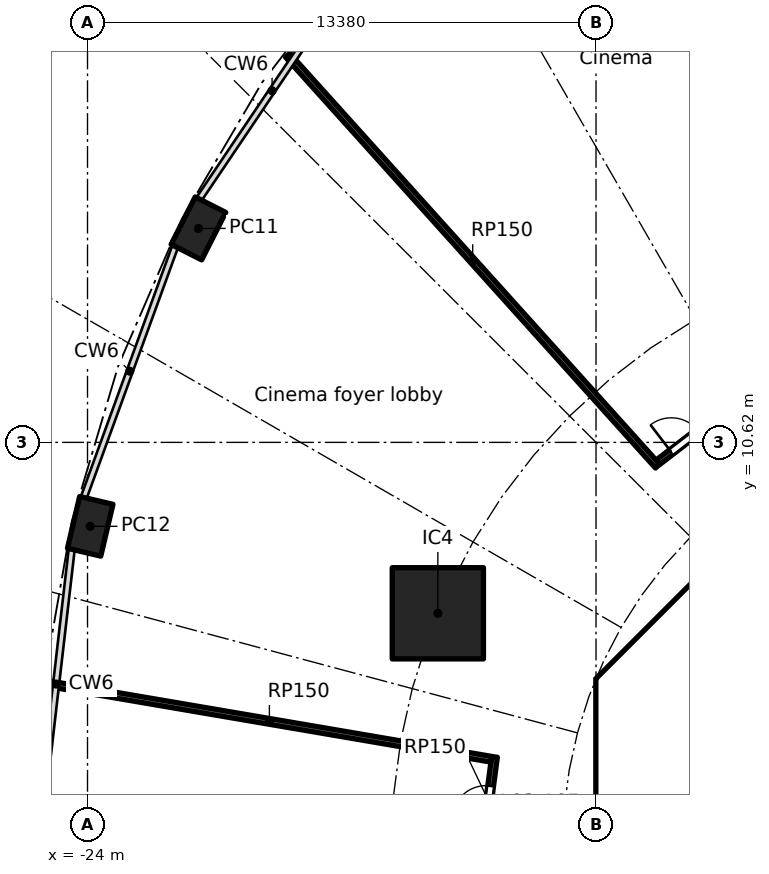
"""IFC4 building model, lengths in metres.
Left out: names, types, materials, properties, quantities, classifications, styles, units other than length and angle.
Written with IfcOpenShell. Run it as: python <this file> out.ifc"""

import sys

from ifc_helpers import new_model, si_unit, direction, frame, frame_2d, origin, origin_2d, place, context, subcontext, project, spatial, polyline, rectangle, hollow_rectangle, outline, extrude, element, fill, save


model = new_model("IFC4")
c1 = context("Model", 3, precision=1e-05, world=origin(), true_north=direction((0.0, 1.0)))
c2 = subcontext(c1, "Body", "Model", "MODEL_VIEW")
j1 = project(units=[si_unit("LENGTHUNIT", "METRE"), si_unit("PLANEANGLEUNIT", "RADIAN")], contexts=[c1])
p1 = place(None, origin())
s1 = spatial("IfcSite", under=j1, at=p1, CompositionType="ELEMENT")
p2 = place(p1, origin())
s2 = spatial("IfcBuilding", under=s1, at=p2, CompositionType="ELEMENT")
p3 = place(p2, frame((0.0, 0.0, 17.0)))
s3 = spatial("IfcBuildingStorey", under=s2, at=p3, CompositionType="ELEMENT", Elevation=17.0)
for number, where, z_axis, x_axis in (
    (1, (-21.082, 16.25, 0.0), (0.0, 0.0, 1.0), (-0.452, -0.892, 0.0)),
    (2, (-23.929, 8.412, 0.0), (0.0, 0.0, 1.0), (-0.229, -0.973, 0.0)),
):
    element("IfcColumn", number, at=place(p3, frame(where, z_axis=z_axis, x_axis=x_axis)), inside=s3, PredefinedType="COLUMN", context=c2, shape_type="SweptSolid", body=[
        extrude(hollow_rectangle(XDim=1.4, YDim=0.9, WallThickness=0.05, at=origin_2d()), origin(), (0.0, 0.0, 1.0), 5.0),
    ])
p4 = place(p3, frame((-14.782, 6.123, 0.0), z_axis=(0.0, 0.0, 1.0), x_axis=(1.0, 0.0, 0.0)))
e3 = element("IfcColumn", 3, at=p4, inside=s3, PredefinedType="COLUMN", context=c2, shape_type="SweptSolid", body=[
    extrude(rectangle(XDim=2.4, YDim=2.4, at=origin_2d()), origin(), (0.0, 0.0, 1.0), 5.0),
])
p5 = place(p3, frame((-4.613, 9.988, 0.0), z_axis=(0.0, 0.0, 1.0), x_axis=(-0.707106781187, -0.707106781187, 0.0)))
e4 = element("IfcWall", 4, at=p5, inside=s3, PredefinedType="SHEAR", context=c2, shape_type="SweptSolid", body=[
    extrude(rectangle(XDim=7.602, YDim=0.6, at=frame_2d((3.801, 0.0))), origin(), (0.0, 0.0, 1.0), 4.7),
])
p6 = place(p5, frame((0.351, 0.0, 0.0)))
e5 = element("IfcOpeningElement", 5, at=p6, cuts=e4, PredefinedType="OPENING", context=c2, shape_type="SweptSolid", body=[
    extrude(rectangle(XDim=1.1, YDim=2.1, at=frame_2d((0.55, 1.05))), frame((0.0, 0.31, 0.0), z_axis=(0.0, -1.0, 0.0), x_axis=(1.0, 0.0, 0.0)), (0.0, 0.0, 1.0), 0.62),
])
p7 = place(p3, frame((-10.325, 3.801, 0.0), z_axis=(0.0, 0.0, 1.0), x_axis=(0.0, -1.0, 0.0)))
e6 = element("IfcWall", 6, at=p7, inside=s3, PredefinedType="SHEAR", context=c2, shape_type="SweptSolid", body=[
    extrude(rectangle(XDim=7.602, YDim=0.6, at=frame_2d((3.801, 0.0))), origin(), (0.0, 0.0, 1.0), 4.7),
])
p8 = place(p7, frame((0.651, 0.0, 0.0)))
e7 = element("IfcOpeningElement", 7, at=p8, cuts=e6, PredefinedType="OPENING", context=c2, shape_type="SweptSolid", body=[
    extrude(rectangle(XDim=1.5, YDim=2.1, at=frame_2d((0.75, 1.05))), frame((0.0, 0.31, 0.0), z_axis=(0.0, -1.0, 0.0), x_axis=(1.0, 0.0, 0.0)), (0.0, 0.0, 1.0), 0.62),
])
p9 = place(p7, frame((5.451, 0.0, 0.0)))
e8 = element("IfcOpeningElement", 8, at=p9, cuts=e6, PredefinedType="OPENING", context=c2, shape_type="SweptSolid", body=[
    extrude(rectangle(XDim=1.5, YDim=2.1, at=frame_2d((0.75, 1.05))), frame((0.0, 0.31, 0.0), z_axis=(0.0, -1.0, 0.0), x_axis=(1.0, 0.0, 0.0)), (0.0, 0.0, 1.0), 0.62),
])
p10 = place(p3, origin())
e9 = element("IfcWall", 9, at=p10, inside=s3, PredefinedType="SHEAR", context=c2, shape_type="SweptSolid", body=[
    extrude(outline(polyline([(-10.2, 4.825), (-9.776, 4.401), (-10.025, 4.152), (-10.025, 3.801), (-10.625, 3.801), (-10.625, 4.401), (-10.2, 4.825)])), origin(), (0.0, 0.0, 1.0), 4.7),
])
p11 = place(p3, frame((-10.025, 4.0, 0.0), z_axis=(0.0, 0.0, 1.0), x_axis=(1.0, 0.0, 0.0)))
e10 = element("IfcWall", 10, at=p11, inside=s3, PredefinedType="PARTITIONING", context=c2, shape_type="SweptSolid", body=[
    extrude(rectangle(XDim=3.325, YDim=0.2, at=frame_2d((1.662, 0.0))), origin(), (0.0, 0.0, 1.0), 4.7),
])
p12 = place(p3, frame((-18.731, 20.803, 0.0), z_axis=(0.0, 0.0, 1.0), x_axis=(0.669128883479, -0.743146376762, 0.0)))
e11 = element("IfcWall", 11, at=p12, inside=s3, PredefinedType="PARTITIONING", context=c2, shape_type="SweptSolid", body=[
    extrude(rectangle(XDim=14.543, YDim=0.15, at=frame_2d((7.271, 0.0))), origin(), (0.0, 0.0, 1.0), 4.7),
])
p13 = place(p3, frame((-13.598, 0.012, 0.0), z_axis=(0.0, 0.0, 1.0), x_axis=(0.130443774898, 0.991455708335, 0.0)))
e12 = element("IfcWall", 12, at=p13, inside=s3, PredefinedType="PARTITIONING", context=c2, shape_type="SweptSolid", body=[
    extrude(rectangle(XDim=2.353, YDim=0.15, at=frame_2d((1.176, 0.0))), origin(), (0.0, 0.0, 1.0), 4.7),
])
p14 = place(p13, frame((0.683, 0.0, 0.0)))
e13 = element("IfcOpeningElement", 13, at=p14, cuts=e12, PredefinedType="OPENING", context=c2, shape_type="SweptSolid", body=[
    extrude(rectangle(XDim=0.9, YDim=2.1, at=frame_2d((0.45, 1.05))), frame((0.0, 0.085, 0.0), z_axis=(0.0, -1.0, 0.0), x_axis=(1.0, 0.0, 0.0)), (0.0, 0.0, 1.0), 0.17),
])
p15 = place(p3, frame((-13.375, 2.282, 0.0), z_axis=(0.0, 0.0, 1.0), x_axis=(-0.985753347153, 0.168197320361, 0.0)))
e14 = element("IfcWall", 14, at=p15, inside=s3, PredefinedType="PARTITIONING", context=c2, shape_type="SweptSolid", body=[
    extrude(rectangle(XDim=11.847, YDim=0.15, at=frame_2d((5.924, 0.0))), origin(), (0.0, 0.0, 1.0), 4.7),
])
p16 = place(p3, frame((-8.991, 10.097, 0.0), z_axis=(0.0, 0.0, 1.0), x_axis=(0.793399081384, 0.608701813418, 0.0)))
e15 = element("IfcWall", 15, at=p16, inside=s3, PredefinedType="PARTITIONING", context=c2, shape_type="SweptSolid", body=[
    extrude(rectangle(XDim=2.75, YDim=0.15, at=frame_2d((1.375, 0.0))), origin(), (0.0, 0.0, 1.0), 4.7),
])
p17 = place(p16, frame((0.443, 0.0, 0.0)))
e16 = element("IfcOpeningElement", 16, at=p17, cuts=e15, PredefinedType="OPENING", context=c2, shape_type="SweptSolid", body=[
    extrude(rectangle(XDim=1.8, YDim=2.1, at=frame_2d((0.9, 1.05))), frame((0.0, 0.085, 0.0), z_axis=(0.0, -1.0, 0.0), x_axis=(1.0, 0.0, 0.0)), (0.0, 0.0, 1.0), 0.17),
])
p18 = place(p8, origin())
e17 = element("IfcDoor", 17, at=p18, inside=s3, OperationType="DOUBLE_DOOR_SINGLE_SWING", PredefinedType="DOOR", context=c2, shape_type="SweptSolid", body=[
    extrude(rectangle(XDim=1.5, YDim=2.1, at=frame_2d((0.75, 1.05))), frame((0.0, 0.025, 0.0), z_axis=(0.0, -1.0, 0.0), x_axis=(1.0, 0.0, 0.0)), (0.0, 0.0, 1.0), 0.05),
])
fill(e7, e17)
p19 = place(p17, origin())
e18 = element("IfcDoor", 18, at=p19, inside=s3, OperationType="DOUBLE_DOOR_SINGLE_SWING", PredefinedType="DOOR", context=c2, shape_type="SweptSolid", body=[
    extrude(rectangle(XDim=1.8, YDim=2.1, at=frame_2d((0.9, 1.05))), frame((0.0, 0.025, 0.0), z_axis=(0.0, -1.0, 0.0), x_axis=(1.0, 0.0, 0.0)), (0.0, 0.0, 1.0), 0.05),
])
fill(e16, e18)
p20 = place(p14, origin())
e19 = element("IfcDoor", 19, at=p20, inside=s3, OperationType="SINGLE_SWING_LEFT", PredefinedType="DOOR", context=c2, shape_type="SweptSolid", body=[
    extrude(rectangle(XDim=0.9, YDim=2.1, at=frame_2d((0.45, 1.05))), frame((0.0, 0.025, 0.0), z_axis=(0.0, -1.0, 0.0), x_axis=(1.0, 0.0, 0.0)), (0.0, 0.0, 1.0), 0.05),
])
fill(e13, e19)
save(model, sys.argv[1])
